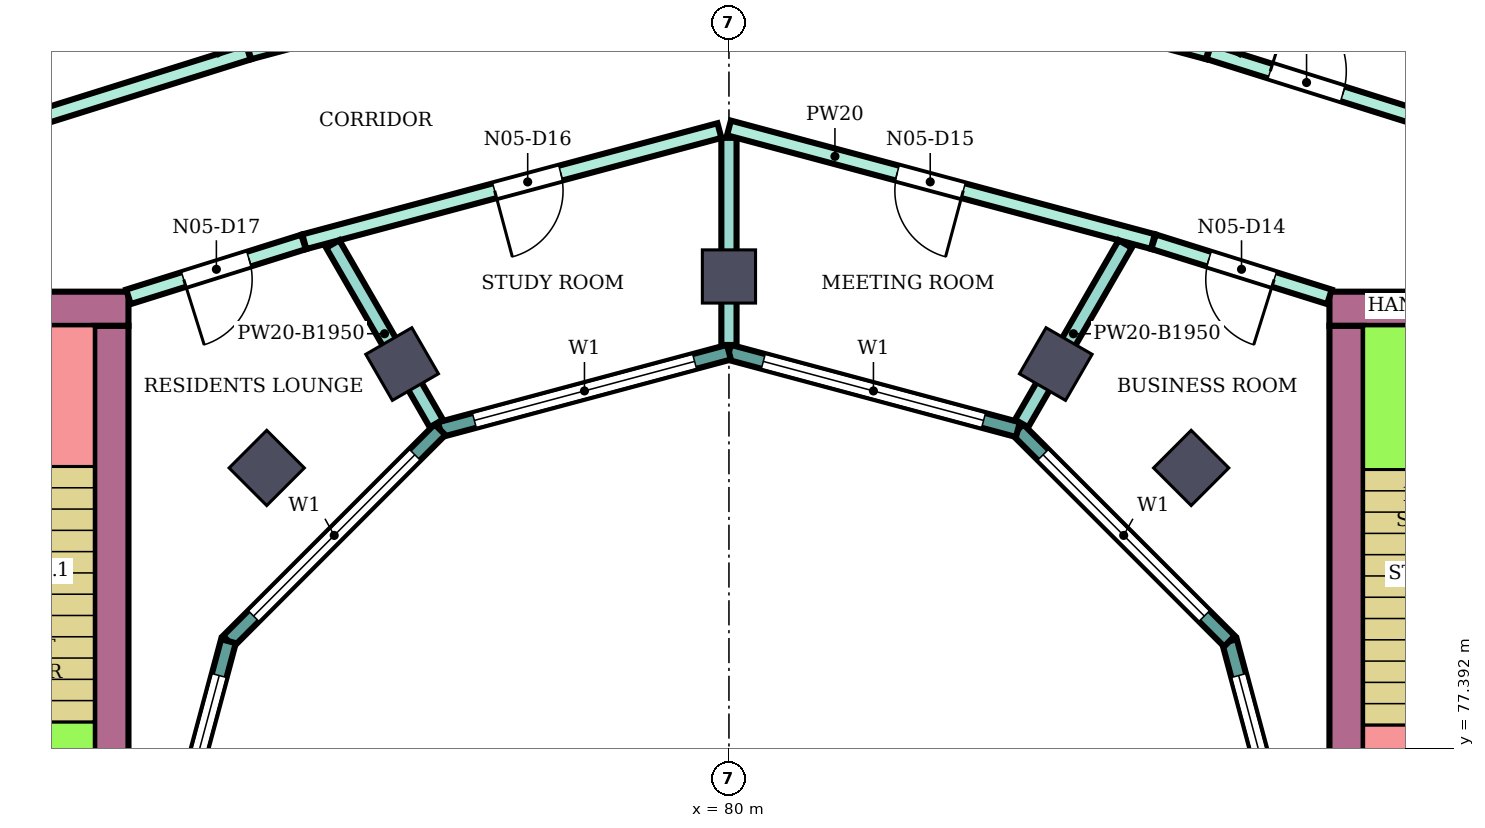
"""IFC4 building model, lengths in metres.
Left out: names, types, materials, properties, quantities, classifications, styles, units other than length and angle.
Written with IfcOpenShell. Run it as: python <this file> out.ifc"""

import sys

from ifc_helpers import new_model, si_unit, direction, frame, frame_2d, origin, origin_2d, place, context, subcontext, project, spatial, rectangle, extrude, element, fill, save


model = new_model("IFC4")
c1 = context("Model", 3, precision=1e-05, world=origin(), true_north=direction((0.0, 1.0)))
c2 = subcontext(c1, "Body", "Model", "MODEL_VIEW")
j1 = project(units=[si_unit("LENGTHUNIT", "METRE"), si_unit("PLANEANGLEUNIT", "RADIAN")], contexts=[c1])
p1 = place(None, origin())
s1 = spatial("IfcSite", under=j1, at=p1, CompositionType="ELEMENT")
p2 = place(p1, origin())
s2 = spatial("IfcBuilding", under=s1, at=p2, CompositionType="ELEMENT")
p3 = place(p2, frame((0.0, 0.0, 323.7)))
s3 = spatial("IfcBuildingStorey", under=s2, at=p3, CompositionType="ELEMENT", Elevation=323.7)
for number, where, z_axis, x_axis in (
    (1, (86.081, 81.081, 0.0), (0.0, 0.0, 1.0), (0.707, 0.707, 0.0)),
    (2, (84.3, 82.448, 0.0), (0.0, 0.0, 1.0), (0.5, 0.866, 0.0)),
    (3, (80.0, 83.6, 0.0), (0.0, 0.0, 1.0), (0.0, 1.0, 0.0)),
    (4, (75.7, 82.448, 0.0), (0.0, 0.0, 1.0), (-0.5, 0.866, 0.0)),
    (5, (73.919, 81.081, 0.0), (0.0, 0.0, 1.0), (-0.707, 0.707, 0.0)),
):
    element("IfcColumn", number, at=place(p3, frame(where, z_axis=z_axis, x_axis=x_axis)), inside=s3, PredefinedType="COLUMN", context=c2, shape_type="SweptSolid", body=[
        extrude(rectangle(XDim=0.7, YDim=0.7, at=origin_2d()), origin(), (0.0, 0.0, 1.0), 4.4),
    ])
p4 = place(p3, frame((87.9, 83.175, 0.0), z_axis=(0.0, 0.0, 1.0), x_axis=(1.0, 0.0, 0.0)))
e6 = element("IfcWall", 6, at=p4, inside=s3, PredefinedType="SHEAR", context=c2, shape_type="SweptSolid", body=[
    extrude(rectangle(XDim=10.0, YDim=0.45, at=frame_2d((5.0, 0.0))), origin(), (0.0, 0.0, 1.0), 4.05),
])
p5 = place(p4, frame((4.2, 0.0, 0.0)))
e7 = element("IfcOpeningElement", 7, at=p5, cuts=e6, PredefinedType="OPENING", context=c2, shape_type="SweptSolid", body=[
    extrude(rectangle(XDim=2.4, YDim=2.4, at=frame_2d((1.2, 1.2))), frame((0.0, 0.235, 0.0), z_axis=(0.0, -1.0, 0.0), x_axis=(1.0, 0.0, 0.0)), (0.0, 0.0, 1.0), 0.47),
])
p6 = place(p3, frame((88.125, 75.0, 0.0), z_axis=(0.0, 0.0, 1.0), x_axis=(0.0, 1.0, 0.0)))
e8 = element("IfcWall", 8, at=p6, inside=s3, PredefinedType="SHEAR", context=c2, shape_type="SweptSolid", body=[
    extrude(rectangle(XDim=7.95, YDim=0.45, at=frame_2d((3.975, 0.0))), origin(), (0.0, 0.0, 1.0), 4.05),
])
p7 = place(p3, frame((72.1, 83.175, 0.0), z_axis=(0.0, 0.0, 1.0), x_axis=(-1.0, 0.0, 0.0)))
e9 = element("IfcWall", 9, at=p7, inside=s3, PredefinedType="SHEAR", context=c2, shape_type="SweptSolid", body=[
    extrude(rectangle(XDim=10.0, YDim=0.45, at=frame_2d((5.0, 0.0))), origin(), (0.0, 0.0, 1.0), 4.05),
])
p8 = place(p7, frame((4.2, 0.0, 0.0)))
e10 = element("IfcOpeningElement", 10, at=p8, cuts=e9, PredefinedType="OPENING", context=c2, shape_type="SweptSolid", body=[
    extrude(rectangle(XDim=2.4, YDim=2.4, at=frame_2d((1.2, 1.2))), frame((0.0, 0.235, 0.0), z_axis=(0.0, -1.0, 0.0), x_axis=(1.0, 0.0, 0.0)), (0.0, 0.0, 1.0), 0.47),
])
p9 = place(p3, frame((71.875, 82.95, 0.0), z_axis=(0.0, 0.0, 1.0), x_axis=(0.0, -1.0, 0.0)))
e11 = element("IfcWall", 11, at=p9, inside=s3, PredefinedType="SHEAR", context=c2, shape_type="SweptSolid", body=[
    extrude(rectangle(XDim=7.95, YDim=0.45, at=frame_2d((3.975, 0.0))), origin(), (0.0, 0.0, 1.0), 4.05),
])
p10 = place(p3, frame((87.604, 75.0, 0.0), z_axis=(0.0, 0.0, 1.0), x_axis=(-0.258789828301, 0.965933654434, 0.0)))
e12 = element("IfcWall", 12, at=p10, inside=s3, PredefinedType="NOTDEFINED", context=c2, shape_type="SweptSolid", body=[
    extrude(rectangle(XDim=3.936, YDim=0.2, at=frame_2d((1.968, 0.0))), origin(), (0.0, 0.0, 1.0), 4.4),
])
p11 = place(p10, frame((0.468, 0.0, 0.9)))
e13 = element("IfcOpeningElement", 13, at=p11, cuts=e12, PredefinedType="OPENING", context=c2, shape_type="SweptSolid", body=[
    extrude(rectangle(XDim=3.0, YDim=2.3, at=frame_2d((1.5, 1.15))), frame((0.0, 0.11, 0.0), z_axis=(0.0, -1.0, 0.0), x_axis=(1.0, 0.0, 0.0)), (0.0, 0.0, 1.0), 0.22),
])
p12 = place(p3, frame((86.585, 78.802, 0.0), z_axis=(0.0, 0.0, 1.0), x_axis=(-0.707106781187, 0.707106781187, 0.0)))
e14 = element("IfcWall", 14, at=p12, inside=s3, PredefinedType="NOTDEFINED", context=c2, shape_type="SweptSolid", body=[
    extrude(rectangle(XDim=3.936, YDim=0.2, at=frame_2d((1.968, 0.0))), origin(), (0.0, 0.0, 1.0), 4.4),
])
p13 = place(p12, frame((0.468, 0.0, 0.9)))
e15 = element("IfcOpeningElement", 15, at=p13, cuts=e14, PredefinedType="OPENING", context=c2, shape_type="SweptSolid", body=[
    extrude(rectangle(XDim=3.0, YDim=2.3, at=frame_2d((1.5, 1.15))), frame((0.0, 0.11, 0.0), z_axis=(0.0, -1.0, 0.0), x_axis=(1.0, 0.0, 0.0)), (0.0, 0.0, 1.0), 0.22),
])
p14 = place(p3, frame((83.802, 81.585, 0.0), z_axis=(0.0, 0.0, 1.0), x_axis=(-0.965933654434, 0.258789828301, 0.0)))
e16 = element("IfcWall", 16, at=p14, inside=s3, PredefinedType="NOTDEFINED", context=c2, shape_type="SweptSolid", body=[
    extrude(rectangle(XDim=3.936, YDim=0.2, at=frame_2d((1.968, 0.0))), origin(), (0.0, 0.0, 1.0), 4.4),
])
p15 = place(p14, frame((0.468, 0.0, 0.9)))
e17 = element("IfcOpeningElement", 17, at=p15, cuts=e16, PredefinedType="OPENING", context=c2, shape_type="SweptSolid", body=[
    extrude(rectangle(XDim=3.0, YDim=2.3, at=frame_2d((1.5, 1.15))), frame((0.0, 0.11, 0.0), z_axis=(0.0, -1.0, 0.0), x_axis=(1.0, 0.0, 0.0)), (0.0, 0.0, 1.0), 0.22),
])
p16 = place(p3, frame((80.0, 82.604, 0.0), z_axis=(0.0, 0.0, 1.0), x_axis=(-0.965933654434, -0.258789828301, 0.0)))
e18 = element("IfcWall", 18, at=p16, inside=s3, PredefinedType="NOTDEFINED", context=c2, shape_type="SweptSolid", body=[
    extrude(rectangle(XDim=3.936, YDim=0.2, at=frame_2d((1.968, 0.0))), origin(), (0.0, 0.0, 1.0), 4.4),
])
p17 = place(p16, frame((0.468, 0.0, 0.9)))
e19 = element("IfcOpeningElement", 19, at=p17, cuts=e18, PredefinedType="OPENING", context=c2, shape_type="SweptSolid", body=[
    extrude(rectangle(XDim=3.0, YDim=2.3, at=frame_2d((1.5, 1.15))), frame((0.0, 0.11, 0.0), z_axis=(0.0, -1.0, 0.0), x_axis=(1.0, 0.0, 0.0)), (0.0, 0.0, 1.0), 0.22),
])
p18 = place(p3, frame((76.198, 81.585, 0.0), z_axis=(0.0, 0.0, 1.0), x_axis=(-0.707106781187, -0.707106781187, 0.0)))
e20 = element("IfcWall", 20, at=p18, inside=s3, PredefinedType="NOTDEFINED", context=c2, shape_type="SweptSolid", body=[
    extrude(rectangle(XDim=3.936, YDim=0.2, at=frame_2d((1.968, 0.0))), origin(), (0.0, 0.0, 1.0), 4.4),
])
p19 = place(p18, frame((0.468, 0.0, 0.9)))
e21 = element("IfcOpeningElement", 21, at=p19, cuts=e20, PredefinedType="OPENING", context=c2, shape_type="SweptSolid", body=[
    extrude(rectangle(XDim=3.0, YDim=2.3, at=frame_2d((1.5, 1.15))), frame((0.0, 0.11, 0.0), z_axis=(0.0, -1.0, 0.0), x_axis=(1.0, 0.0, 0.0)), (0.0, 0.0, 1.0), 0.22),
])
p20 = place(p3, frame((73.415, 78.802, 0.0), z_axis=(0.0, 0.0, 1.0), x_axis=(-0.258789828301, -0.965933654434, 0.0)))
e22 = element("IfcWall", 22, at=p20, inside=s3, PredefinedType="NOTDEFINED", context=c2, shape_type="SweptSolid", body=[
    extrude(rectangle(XDim=3.936, YDim=0.2, at=frame_2d((1.968, 0.0))), origin(), (0.0, 0.0, 1.0), 4.4),
])
p21 = place(p20, frame((0.468, 0.0, 0.9)))
e23 = element("IfcOpeningElement", 23, at=p21, cuts=e22, PredefinedType="OPENING", context=c2, shape_type="SweptSolid", body=[
    extrude(rectangle(XDim=3.0, YDim=2.3, at=frame_2d((1.5, 1.15))), frame((0.0, 0.11, 0.0), z_axis=(0.0, -1.0, 0.0), x_axis=(1.0, 0.0, 0.0)), (0.0, 0.0, 1.0), 0.22),
])
p22 = place(p3, frame((68.201, 84.834, 0.0), z_axis=(0.0, 0.0, 1.0), x_axis=(0.954232917497, 0.29906443982, 0.0)))
e24 = element("IfcWall", 24, at=p22, inside=s3, PredefinedType="PARTITIONING", context=c2, shape_type="SweptSolid", body=[
    extrude(rectangle(XDim=5.74, YDim=0.2, at=frame_2d((2.87, 0.0))), origin(), (0.0, 0.0, 1.0), 3.95),
])
p23 = place(p3, frame((72.1, 83.332, 0.0), z_axis=(0.0, 0.0, 1.0), x_axis=(0.954233106619, 0.299063836383, 0.0)))
e25 = element("IfcWall", 25, at=p23, inside=s3, PredefinedType="PARTITIONING", context=c2, shape_type="SweptSolid", body=[
    extrude(rectangle(XDim=2.414, YDim=0.2, at=frame_2d((1.207, 0.0))), origin(), (0.0, 0.0, 1.0), 3.95),
])
p24 = place(p23, frame((0.762, 0.0, 0.0)))
e26 = element("IfcOpeningElement", 26, at=p24, cuts=e25, PredefinedType="OPENING", context=c2, shape_type="SweptSolid", body=[
    extrude(rectangle(XDim=0.9, YDim=2.1, at=frame_2d((0.45, 1.05))), frame((0.0, 0.11, 0.0), z_axis=(0.0, -1.0, 0.0), x_axis=(1.0, 0.0, 0.0)), (0.0, 0.0, 1.0), 0.22),
])
p25 = place(p3, frame((73.687, 86.554, 0.0), z_axis=(0.0, 0.0, 1.0), x_axis=(0.96595903825, 0.258695064551, 0.0)))
e27 = element("IfcWall", 27, at=p25, inside=s3, PredefinedType="PARTITIONING", context=c2, shape_type="SweptSolid", body=[
    extrude(rectangle(XDim=6.446, YDim=0.2, at=frame_2d((3.223, 0.0))), origin(), (0.0, 0.0, 1.0), 3.95),
])
p26 = place(p25, frame((3.638, 0.0, 0.0)))
e28 = element("IfcOpeningElement", 28, at=p26, cuts=e27, PredefinedType="OPENING", context=c2, shape_type="SweptSolid", body=[
    extrude(rectangle(XDim=1.0, YDim=2.1, at=frame_2d((0.5, 1.05))), frame((0.0, 0.11, 0.0), z_axis=(0.0, -1.0, 0.0), x_axis=(1.0, 0.0, 0.0)), (0.0, 0.0, 1.0), 0.22),
])
p27 = place(p3, frame((74.413, 84.057, 0.0), z_axis=(0.0, 0.0, 1.0), x_axis=(0.965972135939, 0.258646153246, 0.0)))
e29 = element("IfcWall", 29, at=p27, inside=s3, PredefinedType="PARTITIONING", context=c2, shape_type="SweptSolid", body=[
    extrude(rectangle(XDim=5.654, YDim=0.2, at=frame_2d((2.827, 0.0))), origin(), (0.0, 0.0, 1.0), 3.95),
])
p28 = place(p27, frame((2.593, 0.0, 0.0)))
e30 = element("IfcOpeningElement", 30, at=p28, cuts=e29, PredefinedType="OPENING", context=c2, shape_type="SweptSolid", body=[
    extrude(rectangle(XDim=0.9, YDim=2.1, at=frame_2d((0.45, 1.05))), frame((0.0, 0.11, 0.0), z_axis=(0.0, -1.0, 0.0), x_axis=(1.0, 0.0, 0.0)), (0.0, 0.0, 1.0), 0.22),
])
p29 = place(p3, frame((74.787, 84.027, 0.0), z_axis=(0.0, 0.0, 1.0), x_axis=(0.500079107518, -0.86597972622, 0.0)))
e31 = element("IfcWall", 31, at=p29, inside=s3, PredefinedType="PARTITIONING", context=c2, shape_type="SweptSolid", body=[
    extrude(rectangle(XDim=2.726, YDim=0.2, at=frame_2d((1.363, 0.0))), origin(), (0.0, 0.0, 1.0), 2.45),
])
p30 = place(p3, frame((80.0, 82.699, 0.0), z_axis=(0.0, 0.0, 1.0), x_axis=(0.0, 1.0, 0.0)))
e32 = element("IfcWall", 32, at=p30, inside=s3, PredefinedType="PARTITIONING", context=c2, shape_type="SweptSolid", body=[
    extrude(rectangle(XDim=2.725, YDim=0.2, at=frame_2d((1.363, 0.0))), origin(), (0.0, 0.0, 1.0), 2.45),
])
p31 = place(p3, frame((80.0, 85.554, 0.0), z_axis=(0.0, 0.0, 1.0), x_axis=(0.965928989968, -0.258807237802, 0.0)))
e33 = element("IfcWall", 33, at=p31, inside=s3, PredefinedType="PARTITIONING", context=c2, shape_type="SweptSolid", body=[
    extrude(rectangle(XDim=5.774, YDim=0.2, at=frame_2d((2.887, 0.0))), origin(), (0.0, 0.0, 1.0), 3.95),
])
p32 = place(p31, frame((2.292, 0.0, 0.0)))
e34 = element("IfcOpeningElement", 34, at=p32, cuts=e33, PredefinedType="OPENING", context=c2, shape_type="SweptSolid", body=[
    extrude(rectangle(XDim=0.9, YDim=2.1, at=frame_2d((0.45, 1.05))), frame((0.0, 0.11, 0.0), z_axis=(0.0, -1.0, 0.0), x_axis=(1.0, 0.0, 0.0)), (0.0, 0.0, 1.0), 0.22),
])
p33 = place(p3, frame((80.0, 88.247, 0.0), z_axis=(0.0, 0.0, 1.0), x_axis=(0.965807659316, -0.259259648244, 0.0)))
e35 = element("IfcWall", 35, at=p33, inside=s3, PredefinedType="PARTITIONING", context=c2, shape_type="SweptSolid", body=[
    extrude(rectangle(XDim=6.526, YDim=0.2, at=frame_2d((3.263, 0.0))), origin(), (0.0, 0.0, 1.0), 3.95),
])
p34 = place(p33, frame((1.93, 0.0, 0.0)))
e36 = element("IfcOpeningElement", 36, at=p34, cuts=e35, PredefinedType="OPENING", context=c2, shape_type="SweptSolid", body=[
    extrude(rectangle(XDim=1.0, YDim=2.1, at=frame_2d((0.5, 1.05))), frame((0.0, 0.11, 0.0), z_axis=(0.0, -1.0, 0.0), x_axis=(1.0, 0.0, 0.0)), (0.0, 0.0, 1.0), 0.22),
])
p35 = place(p3, frame((83.85, 81.667, 0.0), z_axis=(0.0, 0.0, 1.0), x_axis=(0.500185068774, 0.865918527909, 0.0)))
e37 = element("IfcWall", 37, at=p35, inside=s3, PredefinedType="PARTITIONING", context=c2, shape_type="SweptSolid", body=[
    extrude(rectangle(XDim=2.726, YDim=0.2, at=frame_2d((1.363, 0.0))), origin(), (0.0, 0.0, 1.0), 2.45),
])
p36 = place(p3, frame((85.587, 84.057, 0.0), z_axis=(0.0, 0.0, 1.0), x_axis=(0.954239513179, -0.299043393987, 0.0)))
e38 = element("IfcWall", 38, at=p36, inside=s3, PredefinedType="PARTITIONING", context=c2, shape_type="SweptSolid", body=[
    extrude(rectangle(XDim=2.424, YDim=0.2, at=frame_2d((1.212, 0.0))), origin(), (0.0, 0.0, 1.0), 3.95),
])
p37 = place(p36, frame((0.762, 0.0, 0.0)))
e39 = element("IfcOpeningElement", 39, at=p37, cuts=e38, PredefinedType="OPENING", context=c2, shape_type="SweptSolid", body=[
    extrude(rectangle(XDim=0.9, YDim=2.1, at=frame_2d((0.45, 1.05))), frame((0.0, 0.11, 0.0), z_axis=(0.0, -1.0, 0.0), x_axis=(1.0, 0.0, 0.0)), (0.0, 0.0, 1.0), 0.22),
])
p38 = place(p3, frame((86.313, 86.555, 0.0), z_axis=(0.0, 0.0, 1.0), x_axis=(0.9540216201, -0.299737799389, 0.0)))
e40 = element("IfcWall", 40, at=p38, inside=s3, PredefinedType="PARTITIONING", context=c2, shape_type="SweptSolid", body=[
    extrude(rectangle(XDim=5.719, YDim=0.2, at=frame_2d((2.86, 0.0))), origin(), (0.0, 0.0, 1.0), 3.95),
])
p39 = place(p38, frame((0.848, 0.0, 0.0)))
e41 = element("IfcOpeningElement", 41, at=p39, cuts=e40, PredefinedType="OPENING", context=c2, shape_type="SweptSolid", body=[
    extrude(rectangle(XDim=1.0, YDim=2.1, at=frame_2d((0.5, 1.05))), frame((0.0, 0.11, 0.0), z_axis=(0.0, -1.0, 0.0), x_axis=(1.0, 0.0, 0.0)), (0.0, 0.0, 1.0), 0.22),
])
p40 = place(p3, frame((69.855, 92.579, 0.0), z_axis=(0.0, 0.0, 1.0), x_axis=(0.499801463163, -0.866139998742, 0.0)))
e42 = element("IfcWall", 42, at=p40, inside=s3, PredefinedType="PARTITIONING", context=c2, shape_type="SweptSolid", body=[
    extrude(rectangle(XDim=6.955, YDim=0.1, at=frame_2d((3.478, 0.0))), origin(), (0.0, 0.0, 1.0), 2.45),
])
p41 = place(p40, frame((1.029, 0.0, 0.0)))
e43 = element("IfcOpeningElement", 43, at=p41, cuts=e42, PredefinedType="OPENING", context=c2, shape_type="SweptSolid", body=[
    extrude(rectangle(XDim=0.9, YDim=2.1, at=frame_2d((0.45, 1.05))), frame((0.0, 0.06, 0.0), z_axis=(0.0, -1.0, 0.0), x_axis=(1.0, 0.0, 0.0)), (0.0, 0.0, 1.0), 0.12),
])
p42 = place(p3, frame((86.673, 86.553, 0.0), z_axis=(0.0, 0.0, 1.0), x_axis=(0.500103298341, 0.865965756245, 0.0)))
e44 = element("IfcWall", 44, at=p42, inside=s3, PredefinedType="PARTITIONING", context=c2, shape_type="SweptSolid", body=[
    extrude(rectangle(XDim=6.955, YDim=0.1, at=frame_2d((3.477, 0.0))), origin(), (0.0, 0.0, 1.0), 2.45),
])
p43 = place(p42, frame((5.015, 0.0, 0.0)))
e45 = element("IfcOpeningElement", 45, at=p43, cuts=e44, PredefinedType="OPENING", context=c2, shape_type="SweptSolid", body=[
    extrude(rectangle(XDim=0.9, YDim=2.1, at=frame_2d((0.45, 1.05))), frame((0.0, 0.06, 0.0), z_axis=(0.0, -1.0, 0.0), x_axis=(1.0, 0.0, 0.0)), (0.0, 0.0, 1.0), 0.12),
])
p44 = place(p42, frame((1.028, 0.0, 0.0)))
e46 = element("IfcOpeningElement", 46, at=p44, cuts=e44, PredefinedType="OPENING", context=c2, shape_type="SweptSolid", body=[
    extrude(rectangle(XDim=0.8, YDim=2.1, at=frame_2d((0.4, 1.05))), frame((0.0, 0.06, 0.0), z_axis=(0.0, -1.0, 0.0), x_axis=(1.0, 0.0, 0.0)), (0.0, 0.0, 1.0), 0.12),
])
p45 = place(p11, origin())
e47 = element("IfcWindow", 47, at=p45, inside=s3, PartitioningType="SINGLE_PANEL", PredefinedType="WINDOW", context=c2, shape_type="SweptSolid", body=[
    extrude(rectangle(XDim=3.0, YDim=2.3, at=frame_2d((1.5, 1.15))), frame((0.0, 0.03, 0.0), z_axis=(0.0, -1.0, 0.0), x_axis=(1.0, 0.0, 0.0)), (0.0, 0.0, 1.0), 0.06),
])
fill(e13, e47)
p46 = place(p13, origin())
e48 = element("IfcWindow", 48, at=p46, inside=s3, PartitioningType="SINGLE_PANEL", PredefinedType="WINDOW", context=c2, shape_type="SweptSolid", body=[
    extrude(rectangle(XDim=3.0, YDim=2.3, at=frame_2d((1.5, 1.15))), frame((0.0, 0.03, 0.0), z_axis=(0.0, -1.0, 0.0), x_axis=(1.0, 0.0, 0.0)), (0.0, 0.0, 1.0), 0.06),
])
fill(e15, e48)
p47 = place(p15, origin())
e49 = element("IfcWindow", 49, at=p47, inside=s3, PartitioningType="SINGLE_PANEL", PredefinedType="WINDOW", context=c2, shape_type="SweptSolid", body=[
    extrude(rectangle(XDim=3.0, YDim=2.3, at=frame_2d((1.5, 1.15))), frame((0.0, 0.03, 0.0), z_axis=(0.0, -1.0, 0.0), x_axis=(1.0, 0.0, 0.0)), (0.0, 0.0, 1.0), 0.06),
])
fill(e17, e49)
p48 = place(p17, origin())
e50 = element("IfcWindow", 50, at=p48, inside=s3, PartitioningType="SINGLE_PANEL", PredefinedType="WINDOW", context=c2, shape_type="SweptSolid", body=[
    extrude(rectangle(XDim=3.0, YDim=2.3, at=frame_2d((1.5, 1.15))), frame((0.0, 0.03, 0.0), z_axis=(0.0, -1.0, 0.0), x_axis=(1.0, 0.0, 0.0)), (0.0, 0.0, 1.0), 0.06),
])
fill(e19, e50)
p49 = place(p19, origin())
e51 = element("IfcWindow", 51, at=p49, inside=s3, PartitioningType="SINGLE_PANEL", PredefinedType="WINDOW", context=c2, shape_type="SweptSolid", body=[
    extrude(rectangle(XDim=3.0, YDim=2.3, at=frame_2d((1.5, 1.15))), frame((0.0, 0.03, 0.0), z_axis=(0.0, -1.0, 0.0), x_axis=(1.0, 0.0, 0.0)), (0.0, 0.0, 1.0), 0.06),
])
fill(e21, e51)
p50 = place(p21, origin())
e52 = element("IfcWindow", 52, at=p50, inside=s3, PartitioningType="SINGLE_PANEL", PredefinedType="WINDOW", context=c2, shape_type="SweptSolid", body=[
    extrude(rectangle(XDim=3.0, YDim=2.3, at=frame_2d((1.5, 1.15))), frame((0.0, 0.03, 0.0), z_axis=(0.0, -1.0, 0.0), x_axis=(1.0, 0.0, 0.0)), (0.0, 0.0, 1.0), 0.06),
])
fill(e23, e52)
p51 = place(p39, origin())
e53 = element("IfcDoor", 53, at=p51, inside=s3, OperationType="SINGLE_SWING_LEFT", PredefinedType="DOOR", context=c2, shape_type="SweptSolid", body=[
    extrude(rectangle(XDim=1.0, YDim=2.1, at=frame_2d((0.5, 1.05))), frame((0.0, 0.025, 0.0), z_axis=(0.0, -1.0, 0.0), x_axis=(1.0, 0.0, 0.0)), (0.0, 0.0, 1.0), 0.05),
])
fill(e41, e53)
p52 = place(p37, frame((0.9, 0.0, 0.0), z_axis=(0.0, 0.0, 1.0), x_axis=(-1.0, 0.0, 0.0)))
e54 = element("IfcDoor", 54, at=p52, inside=s3, OperationType="SINGLE_SWING_LEFT", PredefinedType="DOOR", context=c2, shape_type="SweptSolid", body=[
    extrude(rectangle(XDim=0.9, YDim=2.1, at=frame_2d((0.45, 1.05))), frame((0.0, 0.025, 0.0), z_axis=(0.0, -1.0, 0.0), x_axis=(1.0, 0.0, 0.0)), (0.0, 0.0, 1.0), 0.05),
])
fill(e39, e54)
p53 = place(p32, frame((0.9, 0.0, 0.0), z_axis=(0.0, 0.0, 1.0), x_axis=(-1.0, 0.0, 0.0)))
e55 = element("IfcDoor", 55, at=p53, inside=s3, OperationType="SINGLE_SWING_LEFT", PredefinedType="DOOR", context=c2, shape_type="SweptSolid", body=[
    extrude(rectangle(XDim=0.9, YDim=2.1, at=frame_2d((0.45, 1.05))), frame((0.0, 0.025, 0.0), z_axis=(0.0, -1.0, 0.0), x_axis=(1.0, 0.0, 0.0)), (0.0, 0.0, 1.0), 0.05),
])
fill(e34, e55)
p54 = place(p28, frame((0.9, 0.0, 0.0), z_axis=(0.0, 0.0, 1.0), x_axis=(-1.0, 0.0, 0.0)))
e56 = element("IfcDoor", 56, at=p54, inside=s3, OperationType="SINGLE_SWING_RIGHT", PredefinedType="DOOR", context=c2, shape_type="SweptSolid", body=[
    extrude(rectangle(XDim=0.9, YDim=2.1, at=frame_2d((0.45, 1.05))), frame((0.0, 0.025, 0.0), z_axis=(0.0, -1.0, 0.0), x_axis=(1.0, 0.0, 0.0)), (0.0, 0.0, 1.0), 0.05),
])
fill(e30, e56)
p55 = place(p24, frame((0.9, 0.0, 0.0), z_axis=(0.0, 0.0, 1.0), x_axis=(-1.0, 0.0, 0.0)))
e57 = element("IfcDoor", 57, at=p55, inside=s3, OperationType="SINGLE_SWING_RIGHT", PredefinedType="DOOR", context=c2, shape_type="SweptSolid", body=[
    extrude(rectangle(XDim=0.9, YDim=2.1, at=frame_2d((0.45, 1.05))), frame((0.0, 0.025, 0.0), z_axis=(0.0, -1.0, 0.0), x_axis=(1.0, 0.0, 0.0)), (0.0, 0.0, 1.0), 0.05),
])
fill(e26, e57)
save(model, sys.argv[1])
